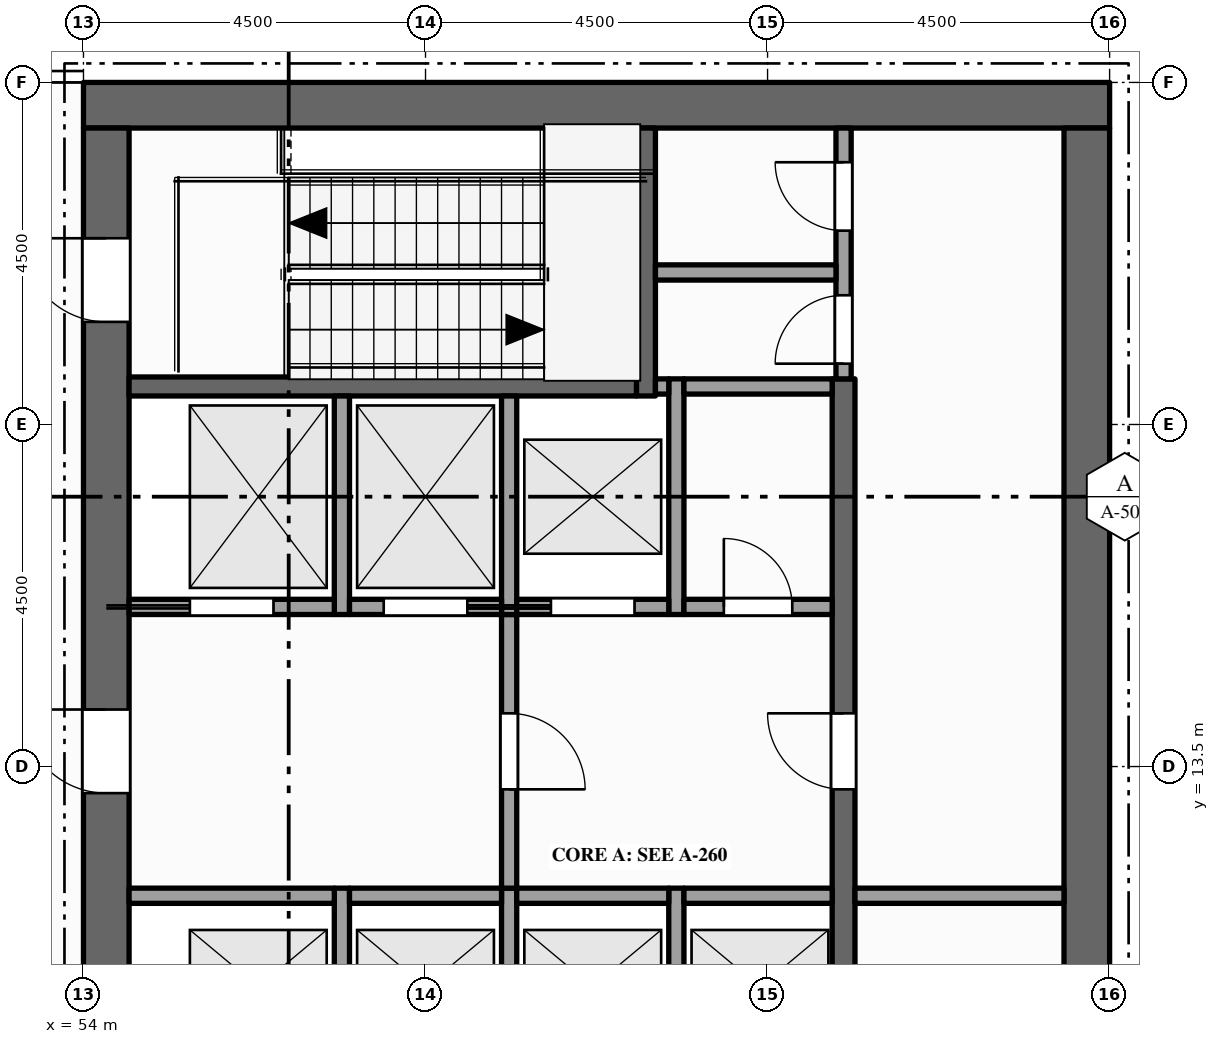
"""IFC4 building model, lengths in metres.
Left out: names, types, materials, properties, quantities, classifications, styles, units other than length and angle.
Written with IfcOpenShell. Run it as: python <this file> out.ifc"""

import sys

from ifc_helpers import new_model, si_unit, direction, frame, frame_2d, origin, place, context, subcontext, project, spatial, rectangle, extrude, element, fill, save


model = new_model("IFC4")
c1 = context("Model", 3, precision=1e-05, world=origin(), true_north=direction((0.0, 1.0)))
c2 = subcontext(c1, "Body", "Model", "MODEL_VIEW")
j1 = project(units=[si_unit("LENGTHUNIT", "METRE"), si_unit("PLANEANGLEUNIT", "RADIAN")], contexts=[c1])
p1 = place(None, origin())
s1 = spatial("IfcSite", under=j1, at=p1, CompositionType="ELEMENT")
p2 = place(p1, origin())
s2 = spatial("IfcBuilding", under=s1, at=p2, CompositionType="ELEMENT")
p3 = place(p2, frame((0.0, 0.0, 332.0)))
s3 = spatial("IfcBuildingStorey", under=s2, at=p3, CompositionType="ELEMENT", Elevation=332.0)
p4 = place(p3, frame((54.0, 22.2, -0.15), z_axis=(0.0, 0.0, 1.0), x_axis=(1.0, 0.0, 0.0)))
e1 = element("IfcWall", 1, at=p4, inside=s3, PredefinedType="SHEAR", context=c2, shape_type="SweptSolid", body=[
    extrude(rectangle(XDim=13.5, YDim=0.6, at=frame_2d((6.75, 0.0))), origin(), (0.0, 0.0, 1.0), 4.5),
])
p5 = place(p3, frame((54.3, 0.6, -0.15), z_axis=(0.0, 0.0, 1.0), x_axis=(0.0, 1.0, 0.0)))
e2 = element("IfcWall", 2, at=p5, inside=s3, PredefinedType="SHEAR", context=c2, shape_type="SweptSolid", body=[
    extrude(rectangle(XDim=21.3, YDim=0.6, at=frame_2d((10.65, 0.0))), origin(), (0.0, 0.0, 1.0), 4.5),
])
p6 = place(p5, frame((6.5, 0.0, 0.15)))
e3 = element("IfcOpeningElement", 3, at=p6, cuts=e2, PredefinedType="OPENING", context=c2, shape_type="SweptSolid", body=[
    extrude(rectangle(XDim=1.8, YDim=2.1, at=frame_2d((0.9, 1.05))), frame((0.0, 0.31, 0.0), z_axis=(0.0, -1.0, 0.0), x_axis=(1.0, 0.0, 0.0)), (0.0, 0.0, 1.0), 0.62),
])
p7 = place(p5, frame((12.55, 0.0, 0.15)))
e4 = element("IfcOpeningElement", 4, at=p7, cuts=e2, PredefinedType="OPENING", context=c2, shape_type="SweptSolid", body=[
    extrude(rectangle(XDim=1.1, YDim=2.1, at=frame_2d((0.55, 1.05))), frame((0.0, 0.31, 0.0), z_axis=(0.0, -1.0, 0.0), x_axis=(1.0, 0.0, 0.0)), (0.0, 0.0, 1.0), 0.62),
])
p8 = place(p5, frame((1.55, 0.0, 0.15)))
e5 = element("IfcOpeningElement", 5, at=p8, cuts=e2, PredefinedType="OPENING", context=c2, shape_type="SweptSolid", body=[
    extrude(rectangle(XDim=1.1, YDim=2.1, at=frame_2d((0.55, 1.05))), frame((0.0, 0.31, 0.0), z_axis=(0.0, -1.0, 0.0), x_axis=(1.0, 0.0, 0.0)), (0.0, 0.0, 1.0), 0.62),
])
p9 = place(p5, frame((18.75, 0.0, 0.15)))
e6 = element("IfcOpeningElement", 6, at=p9, cuts=e2, PredefinedType="OPENING", context=c2, shape_type="SweptSolid", body=[
    extrude(rectangle(XDim=1.1, YDim=2.1, at=frame_2d((0.55, 1.05))), frame((0.0, 0.31, 0.0), z_axis=(0.0, -1.0, 0.0), x_axis=(1.0, 0.0, 0.0)), (0.0, 0.0, 1.0), 0.62),
])
p10 = place(p3, frame((67.2, 0.6, -0.15), z_axis=(0.0, 0.0, 1.0), x_axis=(0.0, 1.0, 0.0)))
e7 = element("IfcWall", 7, at=p10, inside=s3, PredefinedType="SHEAR", context=c2, shape_type="SweptSolid", body=[
    extrude(rectangle(XDim=21.3, YDim=0.6, at=frame_2d((10.65, 0.0))), origin(), (0.0, 0.0, 1.0), 4.5),
])
p11 = place(p3, frame((57.4, 9.3, 0.0), z_axis=(0.0, 0.0, 1.0), x_axis=(0.0, 1.0, 0.0)))
e8 = element("IfcWall", 8, at=p11, inside=s3, PredefinedType="SOLIDWALL", context=c2, shape_type="SweptSolid", body=[
    extrude(rectangle(XDim=2.6, YDim=0.2, at=frame_2d((1.3, 0.0))), origin(), (0.0, 0.0, 1.0), 4.35),
])
p12 = place(p3, frame((57.4, 15.5, 0.0), z_axis=(0.0, 0.0, 1.0), x_axis=(0.0, 1.0, 0.0)))
e9 = element("IfcWall", 9, at=p12, inside=s3, PredefinedType="SOLIDWALL", context=c2, shape_type="SweptSolid", body=[
    extrude(rectangle(XDim=2.875, YDim=0.2, at=frame_2d((1.438, 0.0))), origin(), (0.0, 0.0, 1.0), 4.35),
])
p13 = place(p3, frame((59.6, 9.3, 0.0), z_axis=(0.0, 0.0, 1.0), x_axis=(0.0, 1.0, 0.0)))
e10 = element("IfcWall", 10, at=p13, inside=s3, PredefinedType="SOLIDWALL", context=c2, shape_type="SweptSolid", body=[
    extrude(rectangle(XDim=2.6, YDim=0.2, at=frame_2d((1.3, 0.0))), origin(), (0.0, 0.0, 1.0), 4.35),
])
p14 = place(p3, frame((59.6, 11.9, 0.0), z_axis=(0.0, 0.0, 1.0), x_axis=(0.0, 1.0, 0.0)))
e11 = element("IfcWall", 11, at=p14, inside=s3, PredefinedType="PARTITIONING", context=c2, shape_type="SweptSolid", body=[
    extrude(rectangle(XDim=3.6, YDim=0.2, at=frame_2d((1.8, 0.0))), origin(), (0.0, 0.0, 1.0), 4.35),
])
p15 = place(p14, frame((1.3, 0.0, 0.0)))
e12 = element("IfcOpeningElement", 12, at=p15, cuts=e11, PredefinedType="OPENING", context=c2, shape_type="SweptSolid", body=[
    extrude(rectangle(XDim=1.0, YDim=2.1, at=frame_2d((0.5, 1.05))), frame((0.0, 0.11, 0.0), z_axis=(0.0, -1.0, 0.0), x_axis=(1.0, 0.0, 0.0)), (0.0, 0.0, 1.0), 0.22),
])
p16 = place(p3, frame((59.6, 15.5, 0.0), z_axis=(0.0, 0.0, 1.0), x_axis=(0.0, 1.0, 0.0)))
e13 = element("IfcWall", 13, at=p16, inside=s3, PredefinedType="SOLIDWALL", context=c2, shape_type="SweptSolid", body=[
    extrude(rectangle(XDim=2.875, YDim=0.2, at=frame_2d((1.438, 0.0))), origin(), (0.0, 0.0, 1.0), 4.35),
])
p17 = place(p3, frame((61.4, 18.375, 0.0), z_axis=(0.0, 0.0, 1.0), x_axis=(0.0, 1.0, 0.0)))
e14 = element("IfcWall", 14, at=p17, inside=s3, PredefinedType="SHEAR", context=c2, shape_type="SweptSolid", body=[
    extrude(rectangle(XDim=3.525, YDim=0.25, at=frame_2d((1.762, 0.0))), origin(), (0.0, 0.0, 1.0), 4.35),
])
p18 = place(p3, frame((61.8, 9.3, 0.0), z_axis=(0.0, 0.0, 1.0), x_axis=(0.0, 1.0, 0.0)))
e15 = element("IfcWall", 15, at=p18, inside=s3, PredefinedType="SOLIDWALL", context=c2, shape_type="SweptSolid", body=[
    extrude(rectangle(XDim=2.6, YDim=0.2, at=frame_2d((1.3, 0.0))), origin(), (0.0, 0.0, 1.0), 4.35),
])
p19 = place(p3, frame((61.8, 15.5, 0.0), z_axis=(0.0, 0.0, 1.0), x_axis=(0.0, 1.0, 0.0)))
e16 = element("IfcWall", 16, at=p19, inside=s3, PredefinedType="SOLIDWALL", context=c2, shape_type="SweptSolid", body=[
    extrude(rectangle(XDim=3.1, YDim=0.2, at=frame_2d((1.55, 0.0))), origin(), (0.0, 0.0, 1.0), 4.35),
])
p20 = place(p3, frame((64.0, 4.1, 0.0), z_axis=(0.0, 0.0, 1.0), x_axis=(0.0, 1.0, 0.0)))
e17 = element("IfcWall", 17, at=p20, inside=s3, PredefinedType="SHEAR", context=c2, shape_type="SweptSolid", body=[
    extrude(rectangle(XDim=14.5, YDim=0.3, at=frame_2d((7.25, 0.0))), origin(), (0.0, 0.0, 1.0), 4.35),
])
p21 = place(p20, frame((3.4, 0.0, 0.0)))
e18 = element("IfcOpeningElement", 18, at=p21, cuts=e17, PredefinedType="OPENING", context=c2, shape_type="SweptSolid", body=[
    extrude(rectangle(XDim=1.0, YDim=2.1, at=frame_2d((0.5, 1.05))), frame((0.0, 0.16, 0.0), z_axis=(0.0, -1.0, 0.0), x_axis=(1.0, 0.0, 0.0)), (0.0, 0.0, 1.0), 0.32),
])
p22 = place(p20, frame((9.1, 0.0, 0.0)))
e19 = element("IfcOpeningElement", 19, at=p22, cuts=e17, PredefinedType="OPENING", context=c2, shape_type="SweptSolid", body=[
    extrude(rectangle(XDim=1.0, YDim=2.1, at=frame_2d((0.5, 1.05))), frame((0.0, 0.16, 0.0), z_axis=(0.0, -1.0, 0.0), x_axis=(1.0, 0.0, 0.0)), (0.0, 0.0, 1.0), 0.32),
])
p23 = place(p3, frame((64.0, 18.6, 0.0), z_axis=(0.0, 0.0, 1.0), x_axis=(0.0, 1.0, 0.0)))
e20 = element("IfcWall", 20, at=p23, inside=s3, PredefinedType="PARTITIONING", context=c2, shape_type="SweptSolid", body=[
    extrude(rectangle(XDim=3.3, YDim=0.2, at=frame_2d((1.65, 0.0))), origin(), (0.0, 0.0, 1.0), 4.35),
])
p24 = place(p23, frame((0.2, 0.0, 0.0)))
e21 = element("IfcOpeningElement", 21, at=p24, cuts=e20, PredefinedType="OPENING", context=c2, shape_type="SweptSolid", body=[
    extrude(rectangle(XDim=0.9, YDim=2.1, at=frame_2d((0.45, 1.05))), frame((0.0, 0.11, 0.0), z_axis=(0.0, -1.0, 0.0), x_axis=(1.0, 0.0, 0.0)), (0.0, 0.0, 1.0), 0.22),
])
p25 = place(p23, frame((1.95, 0.0, 0.0)))
e22 = element("IfcOpeningElement", 22, at=p25, cuts=e20, PredefinedType="OPENING", context=c2, shape_type="SweptSolid", body=[
    extrude(rectangle(XDim=0.9, YDim=2.1, at=frame_2d((0.45, 1.05))), frame((0.0, 0.11, 0.0), z_axis=(0.0, -1.0, 0.0), x_axis=(1.0, 0.0, 0.0)), (0.0, 0.0, 1.0), 0.22),
])
p26 = place(p3, frame((54.6, 11.8, 0.0), z_axis=(0.0, 0.0, 1.0), x_axis=(1.0, 0.0, 0.0)))
e23 = element("IfcWall", 23, at=p26, inside=s3, PredefinedType="SOLIDWALL", context=c2, shape_type="SweptSolid", body=[
    extrude(rectangle(XDim=2.7, YDim=0.2, at=frame_2d((1.35, 0.0))), origin(), (0.0, 0.0, 1.0), 4.35),
])
for number, where, z_axis, x_axis in (
    (24, (57.5, 11.8, 0.0), (0.0, 0.0, 1.0), (1.0, 0.0, 0.0)),
    (25, (59.7, 11.8, 0.0), (0.0, 0.0, 1.0), (1.0, 0.0, 0.0)),
):
    element("IfcWall", number, at=place(p3, frame(where, z_axis=z_axis, x_axis=x_axis)), inside=s3, PredefinedType="SOLIDWALL", context=c2, shape_type="SweptSolid", body=[
        extrude(rectangle(XDim=2.0, YDim=0.2, at=frame_2d((1.0, 0.0))), origin(), (0.0, 0.0, 1.0), 4.35),
    ])
p27 = place(p3, frame((61.9, 11.8, 0.0), z_axis=(0.0, 0.0, 1.0), x_axis=(1.0, 0.0, 0.0)))
e26 = element("IfcWall", 26, at=p27, inside=s3, PredefinedType="SOLIDWALL", context=c2, shape_type="SweptSolid", body=[
    extrude(rectangle(XDim=1.95, YDim=0.2, at=frame_2d((0.975, 0.0))), origin(), (0.0, 0.0, 1.0), 4.35),
])
p28 = place(p3, frame((64.15, 11.8, 0.0), z_axis=(0.0, 0.0, 1.0), x_axis=(1.0, 0.0, 0.0)))
e27 = element("IfcWall", 27, at=p28, inside=s3, PredefinedType="PARTITIONING", context=c2, shape_type="SweptSolid", body=[
    extrude(rectangle(XDim=2.75, YDim=0.2, at=frame_2d((1.375, 0.0))), origin(), (0.0, 0.0, 1.0), 4.35),
])
p29 = place(p3, frame((54.6, 15.6, 0.0), z_axis=(0.0, 0.0, 1.0), x_axis=(1.0, 0.0, 0.0)))
e28 = element("IfcWall", 28, at=p29, inside=s3, PredefinedType="SOLIDWALL", context=c2, shape_type="SweptSolid", body=[
    extrude(rectangle(XDim=2.7, YDim=0.2, at=frame_2d((1.35, 0.0))), origin(), (0.0, 0.0, 1.0), 4.35),
])
p30 = place(p29, frame((0.8, 0.0, 0.012)))
e29 = element("IfcOpeningElement", 29, at=p30, cuts=e28, PredefinedType="OPENING", context=c2, shape_type="SweptSolid", body=[
    extrude(rectangle(XDim=1.1, YDim=2.1, at=frame_2d((0.55, 1.05))), frame((0.0, 0.11, 0.0), z_axis=(0.0, -1.0, 0.0), x_axis=(1.0, 0.0, 0.0)), (0.0, 0.0, 1.0), 0.22),
])
p31 = place(p3, frame((57.5, 15.6, 0.0), z_axis=(0.0, 0.0, 1.0), x_axis=(1.0, 0.0, 0.0)))
e30 = element("IfcWall", 30, at=p31, inside=s3, PredefinedType="SOLIDWALL", context=c2, shape_type="SweptSolid", body=[
    extrude(rectangle(XDim=2.0, YDim=0.2, at=frame_2d((1.0, 0.0))), origin(), (0.0, 0.0, 1.0), 4.35),
])
p32 = place(p31, frame((0.45, 0.0, 0.012)))
e31 = element("IfcOpeningElement", 31, at=p32, cuts=e30, PredefinedType="OPENING", context=c2, shape_type="SweptSolid", body=[
    extrude(rectangle(XDim=1.1, YDim=2.1, at=frame_2d((0.55, 1.05))), frame((0.0, 0.11, 0.0), z_axis=(0.0, -1.0, 0.0), x_axis=(1.0, 0.0, 0.0)), (0.0, 0.0, 1.0), 0.22),
])
p33 = place(p3, frame((59.7, 15.6, 0.0), z_axis=(0.0, 0.0, 1.0), x_axis=(1.0, 0.0, 0.0)))
e32 = element("IfcWall", 32, at=p33, inside=s3, PredefinedType="SOLIDWALL", context=c2, shape_type="SweptSolid", body=[
    extrude(rectangle(XDim=2.0, YDim=0.2, at=frame_2d((1.0, 0.0))), origin(), (0.0, 0.0, 1.0), 4.35),
])
p34 = place(p33, frame((0.45, 0.0, 0.012)))
e33 = element("IfcOpeningElement", 33, at=p34, cuts=e32, PredefinedType="OPENING", context=c2, shape_type="SweptSolid", body=[
    extrude(rectangle(XDim=1.1, YDim=2.1, at=frame_2d((0.55, 1.05))), frame((0.0, 0.11, 0.0), z_axis=(0.0, -1.0, 0.0), x_axis=(1.0, 0.0, 0.0)), (0.0, 0.0, 1.0), 0.22),
])
p35 = place(p3, frame((61.9, 15.6, 0.0), z_axis=(0.0, 0.0, 1.0), x_axis=(1.0, 0.0, 0.0)))
e34 = element("IfcWall", 34, at=p35, inside=s3, PredefinedType="PARTITIONING", context=c2, shape_type="SweptSolid", body=[
    extrude(rectangle(XDim=1.95, YDim=0.2, at=frame_2d((0.975, 0.0))), origin(), (0.0, 0.0, 1.0), 4.35),
])
p36 = place(p35, frame((0.525, 0.0, 0.0)))
e35 = element("IfcOpeningElement", 35, at=p36, cuts=e34, PredefinedType="OPENING", context=c2, shape_type="SweptSolid", body=[
    extrude(rectangle(XDim=0.9, YDim=2.1, at=frame_2d((0.45, 1.05))), frame((0.0, 0.11, 0.0), z_axis=(0.0, -1.0, 0.0), x_axis=(1.0, 0.0, 0.0)), (0.0, 0.0, 1.0), 0.22),
])
p37 = place(p3, frame((54.6, 18.5, 0.0), z_axis=(0.0, 0.0, 1.0), x_axis=(1.0, 0.0, 0.0)))
e36 = element("IfcWall", 36, at=p37, inside=s3, PredefinedType="SHEAR", context=c2, shape_type="SweptSolid", body=[
    extrude(rectangle(XDim=6.675, YDim=0.25, at=frame_2d((3.337, 0.0))), origin(), (0.0, 0.0, 1.0), 4.35),
])
p38 = place(p3, frame((61.525, 18.5, 0.0), z_axis=(0.0, 0.0, 1.0), x_axis=(1.0, 0.0, 0.0)))
e37 = element("IfcWall", 37, at=p38, inside=s3, PredefinedType="SOLIDWALL", context=c2, shape_type="SweptSolid", body=[
    extrude(rectangle(XDim=0.175, YDim=0.2, at=frame_2d((0.087, 0.0))), origin(), (0.0, 0.0, 1.0), 4.35),
])
p39 = place(p3, frame((61.9, 18.5, 0.0), z_axis=(0.0, 0.0, 1.0), x_axis=(1.0, 0.0, 0.0)))
e38 = element("IfcWall", 38, at=p39, inside=s3, PredefinedType="PARTITIONING", context=c2, shape_type="SweptSolid", body=[
    extrude(rectangle(XDim=1.95, YDim=0.2, at=frame_2d((0.975, 0.0))), origin(), (0.0, 0.0, 1.0), 4.35),
])
p40 = place(p3, frame((61.525, 20.0, 0.0), z_axis=(0.0, 0.0, 1.0), x_axis=(1.0, 0.0, 0.0)))
e39 = element("IfcWall", 39, at=p40, inside=s3, PredefinedType="PARTITIONING", context=c2, shape_type="SweptSolid", body=[
    extrude(rectangle(XDim=2.375, YDim=0.2, at=frame_2d((1.188, 0.0))), origin(), (0.0, 0.0, 1.0), 4.35),
])
p41 = place(p30, origin())
e40 = element("IfcDoor", 40, at=p41, inside=s3, OperationType="SLIDING_TO_LEFT", PredefinedType="DOOR", context=c2, shape_type="SweptSolid", body=[
    extrude(rectangle(XDim=1.1, YDim=2.1, at=frame_2d((0.55, 1.05))), frame((0.0, 0.025, 0.0), z_axis=(0.0, -1.0, 0.0), x_axis=(1.0, 0.0, 0.0)), (0.0, 0.0, 1.0), 0.05),
])
fill(e29, e40)
p42 = place(p32, origin())
e41 = element("IfcDoor", 41, at=p42, inside=s3, OperationType="SLIDING_TO_RIGHT", PredefinedType="DOOR", context=c2, shape_type="SweptSolid", body=[
    extrude(rectangle(XDim=1.1, YDim=2.1, at=frame_2d((0.55, 1.05))), frame((0.0, 0.025, 0.0), z_axis=(0.0, -1.0, 0.0), x_axis=(1.0, 0.0, 0.0)), (0.0, 0.0, 1.0), 0.05),
])
fill(e31, e41)
p43 = place(p34, origin())
e42 = element("IfcDoor", 42, at=p43, inside=s3, OperationType="SLIDING_TO_LEFT", PredefinedType="DOOR", context=c2, shape_type="SweptSolid", body=[
    extrude(rectangle(XDim=1.1, YDim=2.1, at=frame_2d((0.55, 1.05))), frame((0.0, 0.025, 0.0), z_axis=(0.0, -1.0, 0.0), x_axis=(1.0, 0.0, 0.0)), (0.0, 0.0, 1.0), 0.05),
])
fill(e33, e42)
p44 = place(p7, origin())
e43 = element("IfcDoor", 43, at=p44, inside=s3, OperationType="SINGLE_SWING_RIGHT", PredefinedType="DOOR", context=c2, shape_type="SweptSolid", body=[
    extrude(rectangle(XDim=1.1, YDim=2.1, at=frame_2d((0.55, 1.05))), frame((0.0, 0.025, 0.0), z_axis=(0.0, -1.0, 0.0), x_axis=(1.0, 0.0, 0.0)), (0.0, 0.0, 1.0), 0.05),
])
fill(e4, e43)
p45 = place(p15, origin())
e44 = element("IfcDoor", 44, at=p45, inside=s3, OperationType="SINGLE_SWING_LEFT", PredefinedType="DOOR", context=c2, shape_type="SweptSolid", body=[
    extrude(rectangle(XDim=1.0, YDim=2.1, at=frame_2d((0.5, 1.05))), frame((0.0, 0.025, 0.0), z_axis=(0.0, -1.0, 0.0), x_axis=(1.0, 0.0, 0.0)), (0.0, 0.0, 1.0), 0.05),
])
fill(e12, e44)
p46 = place(p22, origin())
e45 = element("IfcDoor", 45, at=p46, inside=s3, OperationType="SINGLE_SWING_RIGHT", PredefinedType="DOOR", context=c2, shape_type="SweptSolid", body=[
    extrude(rectangle(XDim=1.0, YDim=2.1, at=frame_2d((0.5, 1.05))), frame((0.0, 0.025, 0.0), z_axis=(0.0, -1.0, 0.0), x_axis=(1.0, 0.0, 0.0)), (0.0, 0.0, 1.0), 0.05),
])
fill(e19, e45)
p47 = place(p9, origin())
e46 = element("IfcDoor", 46, at=p47, inside=s3, OperationType="SINGLE_SWING_RIGHT", PredefinedType="DOOR", context=c2, shape_type="SweptSolid", body=[
    extrude(rectangle(XDim=1.1, YDim=2.1, at=frame_2d((0.55, 1.05))), frame((0.0, 0.025, 0.0), z_axis=(0.0, -1.0, 0.0), x_axis=(1.0, 0.0, 0.0)), (0.0, 0.0, 1.0), 0.05),
])
fill(e6, e46)
p48 = place(p24, origin())
e47 = element("IfcDoor", 47, at=p48, inside=s3, OperationType="SINGLE_SWING_LEFT", PredefinedType="DOOR", context=c2, shape_type="SweptSolid", body=[
    extrude(rectangle(XDim=0.9, YDim=2.1, at=frame_2d((0.45, 1.05))), frame((0.0, 0.025, 0.0), z_axis=(0.0, -1.0, 0.0), x_axis=(1.0, 0.0, 0.0)), (0.0, 0.0, 1.0), 0.05),
])
fill(e21, e47)
p49 = place(p25, origin())
e48 = element("IfcDoor", 48, at=p49, inside=s3, OperationType="SINGLE_SWING_RIGHT", PredefinedType="DOOR", context=c2, shape_type="SweptSolid", body=[
    extrude(rectangle(XDim=0.9, YDim=2.1, at=frame_2d((0.45, 1.05))), frame((0.0, 0.025, 0.0), z_axis=(0.0, -1.0, 0.0), x_axis=(1.0, 0.0, 0.0)), (0.0, 0.0, 1.0), 0.05),
])
fill(e22, e48)
p50 = place(p36, origin())
e49 = element("IfcDoor", 49, at=p50, inside=s3, OperationType="SINGLE_SWING_LEFT", PredefinedType="DOOR", context=c2, shape_type="SweptSolid", body=[
    extrude(rectangle(XDim=0.9, YDim=2.1, at=frame_2d((0.45, 1.05))), frame((0.0, 0.025, 0.0), z_axis=(0.0, -1.0, 0.0), x_axis=(1.0, 0.0, 0.0)), (0.0, 0.0, 1.0), 0.05),
])
fill(e35, e49)
save(model, sys.argv[1])
